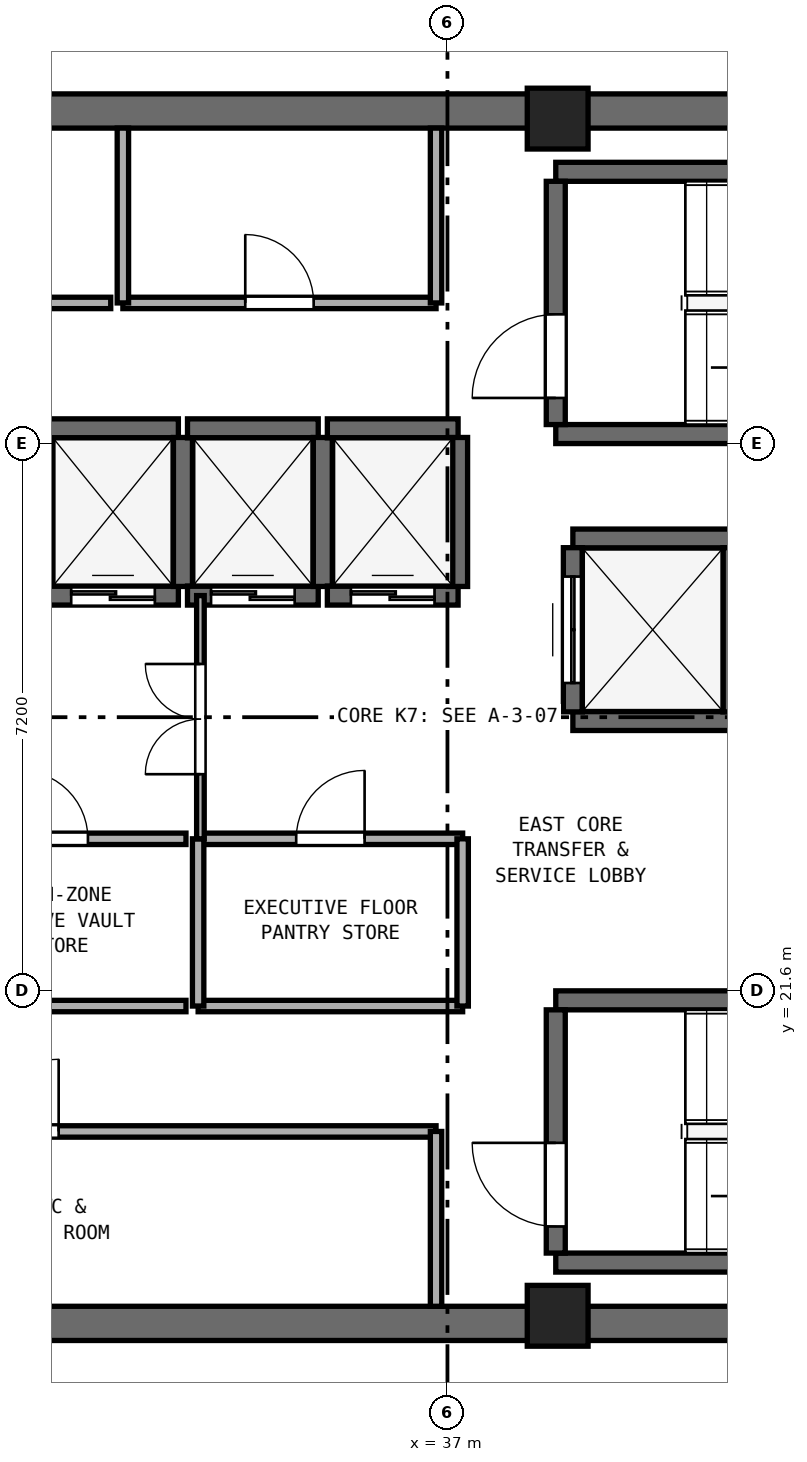
"""IFC4 building model, lengths in metres.
Left out: names, types, materials, properties, quantities, classifications, styles, units other than length and angle.
Written with IfcOpenShell. Run it as: python <this file> out.ifc"""

import sys

from ifc_helpers import new_model, si_unit, direction, frame, frame_2d, origin, origin_2d, place, context, subcontext, project, spatial, rectangle, extrude, element, fill, save


model = new_model("IFC4")
c1 = context("Model", 3, precision=1e-05, world=origin(), true_north=direction((0.0, 1.0)))
c2 = subcontext(c1, "Body", "Model", "MODEL_VIEW")
j1 = project(units=[si_unit("LENGTHUNIT", "METRE"), si_unit("PLANEANGLEUNIT", "RADIAN")], contexts=[c1])
p1 = place(None, origin())
s1 = spatial("IfcSite", under=j1, at=p1, CompositionType="ELEMENT")
p2 = place(p1, origin())
s2 = spatial("IfcBuilding", under=s1, at=p2, CompositionType="ELEMENT")
p3 = place(p2, frame((0.0, 0.0, 232.6)))
s3 = spatial("IfcBuildingStorey", under=s2, at=p3, CompositionType="ELEMENT", Elevation=232.6)
for number, where, z_axis, x_axis in (
    (1, (25.4, 17.225, 0.0), (0.0, 0.0, 1.0), (1.0, 0.0, 0.0)),
    (2, (25.4, 33.175, 0.0), (0.0, 0.0, 1.0), (1.0, 0.0, 0.0)),
):
    element("IfcWall", number, at=place(p3, frame(where, z_axis=z_axis, x_axis=x_axis)), inside=s3, PredefinedType="SHEAR", context=c2, shape_type="SweptSolid", body=[
        extrude(rectangle(XDim=23.2, YDim=0.45, at=frame_2d((11.6, 0.0))), origin(), (0.0, 0.0, 1.0), 3.51),
    ])
for number, where, z_axis, x_axis in (
    (3, (38.45, 17.325, 0.0), (0.0, 0.0, 1.0), (1.0, 0.0, 0.0)),
    (4, (38.45, 33.075, 0.0), (0.0, 0.0, 1.0), (1.0, 0.0, 0.0)),
):
    element("IfcColumn", number, at=place(p3, frame(where, z_axis=z_axis, x_axis=x_axis)), inside=s3, PredefinedType="PILASTER", context=c2, shape_type="SweptSolid", body=[
        extrude(rectangle(XDim=0.8, YDim=0.8, at=origin_2d()), origin(), (0.0, 0.0, 1.0), 3.8),
    ])
for number, where, z_axis, x_axis in (
    (5, (38.425, 28.925, 0.0), (0.0, 0.0, 1.0), (1.0, 0.0, 0.0)),
    (6, (38.425, 32.375, 0.0), (0.0, 0.0, 1.0), (1.0, 0.0, 0.0)),
):
    element("IfcWall", number, at=place(p3, frame(where, z_axis=z_axis, x_axis=x_axis)), inside=s3, PredefinedType="SHEAR", context=c2, shape_type="SweptSolid", body=[
        extrude(rectangle(XDim=7.3, YDim=0.25, at=frame_2d((3.65, 0.0))), origin(), (0.0, 0.0, 1.0), 3.51),
    ])
p4 = place(p3, frame((38.425, 29.05, 0.0), z_axis=(0.0, 0.0, 1.0), x_axis=(0.0, 1.0, 0.0)))
e7 = element("IfcWall", 7, at=p4, inside=s3, PredefinedType="SHEAR", context=c2, shape_type="SweptSolid", body=[
    extrude(rectangle(XDim=3.2, YDim=0.25, at=frame_2d((1.6, 0.0))), origin(), (0.0, 0.0, 1.0), 3.51),
])
p5 = place(p4, frame((0.35, 0.0, 0.0)))
e8 = element("IfcOpeningElement", 8, at=p5, cuts=e7, PredefinedType="OPENING", context=c2, shape_type="SweptSolid", body=[
    extrude(rectangle(XDim=1.1, YDim=2.15, at=frame_2d((0.55, 1.075))), frame((0.0, 0.135, 0.0), z_axis=(0.0, -1.0, 0.0), x_axis=(1.0, 0.0, 0.0)), (0.0, 0.0, 1.0), 0.27),
])
for number, where, z_axis, x_axis in (
    (9, (38.425, 18.025, 0.0), (0.0, 0.0, 1.0), (1.0, 0.0, 0.0)),
    (10, (38.425, 21.475, 0.0), (0.0, 0.0, 1.0), (1.0, 0.0, 0.0)),
):
    element("IfcWall", number, at=place(p3, frame(where, z_axis=z_axis, x_axis=x_axis)), inside=s3, PredefinedType="SHEAR", context=c2, shape_type="SweptSolid", body=[
        extrude(rectangle(XDim=7.3, YDim=0.25, at=frame_2d((3.65, 0.0))), origin(), (0.0, 0.0, 1.0), 3.51),
    ])
p6 = place(p3, frame((38.425, 18.15, 0.0), z_axis=(0.0, 0.0, 1.0), x_axis=(0.0, 1.0, 0.0)))
e11 = element("IfcWall", 11, at=p6, inside=s3, PredefinedType="SHEAR", context=c2, shape_type="SweptSolid", body=[
    extrude(rectangle(XDim=3.2, YDim=0.25, at=frame_2d((1.6, 0.0))), origin(), (0.0, 0.0, 1.0), 3.51),
])
p7 = place(p6, frame((0.35, 0.0, 0.0)))
e12 = element("IfcOpeningElement", 12, at=p7, cuts=e11, PredefinedType="OPENING", context=c2, shape_type="SweptSolid", body=[
    extrude(rectangle(XDim=1.1, YDim=2.15, at=frame_2d((0.55, 1.075))), frame((0.0, 0.135, 0.0), z_axis=(0.0, -1.0, 0.0), x_axis=(1.0, 0.0, 0.0)), (0.0, 0.0, 1.0), 0.27),
])
p8 = place(p3, frame((31.74, 26.8, 0.0), z_axis=(0.0, 0.0, 1.0), x_axis=(1.0, 0.0, 0.0)))
e13 = element("IfcWall", 13, at=p8, inside=s3, PredefinedType="SHEAR", context=c2, shape_type="SweptSolid", body=[
    extrude(rectangle(XDim=1.72, YDim=0.25, at=frame_2d((0.86, 0.0))), origin(), (0.0, 0.0, 1.0), 3.51),
])
p9 = place(p8, frame((0.31, 0.0, 0.0)))
e14 = element("IfcOpeningElement", 14, at=p9, cuts=e13, PredefinedType="OPENING", context=c2, shape_type="SweptSolid", body=[
    extrude(rectangle(XDim=1.1, YDim=2.15, at=frame_2d((0.55, 1.075))), frame((0.0, 0.135, 0.0), z_axis=(0.0, -1.0, 0.0), x_axis=(1.0, 0.0, 0.0)), (0.0, 0.0, 1.0), 0.27),
])
p10 = place(p3, frame((31.74, 29.0, 0.0), z_axis=(0.0, 0.0, 1.0), x_axis=(1.0, 0.0, 0.0)))
e15 = element("IfcWall", 15, at=p10, inside=s3, PredefinedType="SHEAR", context=c2, shape_type="SweptSolid", body=[
    extrude(rectangle(XDim=1.72, YDim=0.25, at=frame_2d((0.86, 0.0))), origin(), (0.0, 0.0, 1.0), 3.51),
])
p11 = place(p3, frame((33.52, 26.92, 0.0), z_axis=(0.0, 0.0, 1.0), x_axis=(0.0, 1.0, 0.0)))
e16 = element("IfcWall", 16, at=p11, inside=s3, PredefinedType="SHEAR", context=c2, shape_type="SweptSolid", body=[
    extrude(rectangle(XDim=1.96, YDim=0.25, at=frame_2d((0.98, 0.0))), origin(), (0.0, 0.0, 1.0), 3.51),
])
p12 = place(p3, frame((33.58, 26.8, 0.0), z_axis=(0.0, 0.0, 1.0), x_axis=(1.0, 0.0, 0.0)))
e17 = element("IfcWall", 17, at=p12, inside=s3, PredefinedType="SHEAR", context=c2, shape_type="SweptSolid", body=[
    extrude(rectangle(XDim=1.72, YDim=0.25, at=frame_2d((0.86, 0.0))), origin(), (0.0, 0.0, 1.0), 3.51),
])
p13 = place(p12, frame((0.31, 0.0, 0.0)))
e18 = element("IfcOpeningElement", 18, at=p13, cuts=e17, PredefinedType="OPENING", context=c2, shape_type="SweptSolid", body=[
    extrude(rectangle(XDim=1.1, YDim=2.15, at=frame_2d((0.55, 1.075))), frame((0.0, 0.135, 0.0), z_axis=(0.0, -1.0, 0.0), x_axis=(1.0, 0.0, 0.0)), (0.0, 0.0, 1.0), 0.27),
])
p14 = place(p3, frame((33.58, 29.0, 0.0), z_axis=(0.0, 0.0, 1.0), x_axis=(1.0, 0.0, 0.0)))
e19 = element("IfcWall", 19, at=p14, inside=s3, PredefinedType="SHEAR", context=c2, shape_type="SweptSolid", body=[
    extrude(rectangle(XDim=1.72, YDim=0.25, at=frame_2d((0.86, 0.0))), origin(), (0.0, 0.0, 1.0), 3.51),
])
p15 = place(p3, frame((35.36, 26.92, 0.0), z_axis=(0.0, 0.0, 1.0), x_axis=(0.0, 1.0, 0.0)))
e20 = element("IfcWall", 20, at=p15, inside=s3, PredefinedType="SHEAR", context=c2, shape_type="SweptSolid", body=[
    extrude(rectangle(XDim=1.96, YDim=0.25, at=frame_2d((0.98, 0.0))), origin(), (0.0, 0.0, 1.0), 3.51),
])
p16 = place(p3, frame((35.42, 26.8, 0.0), z_axis=(0.0, 0.0, 1.0), x_axis=(1.0, 0.0, 0.0)))
e21 = element("IfcWall", 21, at=p16, inside=s3, PredefinedType="SHEAR", context=c2, shape_type="SweptSolid", body=[
    extrude(rectangle(XDim=1.72, YDim=0.25, at=frame_2d((0.86, 0.0))), origin(), (0.0, 0.0, 1.0), 3.51),
])
p17 = place(p16, frame((0.31, 0.0, 0.0)))
e22 = element("IfcOpeningElement", 22, at=p17, cuts=e21, PredefinedType="OPENING", context=c2, shape_type="SweptSolid", body=[
    extrude(rectangle(XDim=1.1, YDim=2.15, at=frame_2d((0.55, 1.075))), frame((0.0, 0.135, 0.0), z_axis=(0.0, -1.0, 0.0), x_axis=(1.0, 0.0, 0.0)), (0.0, 0.0, 1.0), 0.27),
])
p18 = place(p3, frame((35.42, 29.0, 0.0), z_axis=(0.0, 0.0, 1.0), x_axis=(1.0, 0.0, 0.0)))
e23 = element("IfcWall", 23, at=p18, inside=s3, PredefinedType="SHEAR", context=c2, shape_type="SweptSolid", body=[
    extrude(rectangle(XDim=1.72, YDim=0.25, at=frame_2d((0.86, 0.0))), origin(), (0.0, 0.0, 1.0), 3.51),
])
p19 = place(p3, frame((37.14, 26.92, 0.0), z_axis=(0.0, 0.0, 1.0), x_axis=(0.0, 1.0, 0.0)))
e24 = element("IfcWall", 24, at=p19, inside=s3, PredefinedType="SHEAR", context=c2, shape_type="SweptSolid", body=[
    extrude(rectangle(XDim=1.96, YDim=0.25, at=frame_2d((0.98, 0.0))), origin(), (0.0, 0.0, 1.0), 3.51),
])
for number, where, z_axis, x_axis in (
    (25, (38.65, 25.15, 0.0), (0.0, 0.0, 1.0), (1.0, 0.0, 0.0)),
    (26, (38.65, 27.55, 0.0), (0.0, 0.0, 1.0), (1.0, 0.0, 0.0)),
):
    element("IfcWall", number, at=place(p3, frame(where, z_axis=z_axis, x_axis=x_axis)), inside=s3, PredefinedType="SHEAR", context=c2, shape_type="SweptSolid", body=[
        extrude(rectangle(XDim=2.1, YDim=0.25, at=frame_2d((1.05, 0.0))), origin(), (0.0, 0.0, 1.0), 3.51),
    ])
p20 = place(p3, frame((38.65, 25.27, 0.0), z_axis=(0.0, 0.0, 1.0), x_axis=(0.0, 1.0, 0.0)))
e27 = element("IfcWall", 27, at=p20, inside=s3, PredefinedType="SHEAR", context=c2, shape_type="SweptSolid", body=[
    extrude(rectangle(XDim=2.16, YDim=0.25, at=frame_2d((1.08, 0.0))), origin(), (0.0, 0.0, 1.0), 3.51),
])
p21 = place(p20, frame((0.38, 0.0, 0.0)))
e28 = element("IfcOpeningElement", 28, at=p21, cuts=e27, PredefinedType="OPENING", context=c2, shape_type="SweptSolid", body=[
    extrude(rectangle(XDim=1.4, YDim=2.2, at=frame_2d((0.7, 1.1))), frame((0.0, 0.135, 0.0), z_axis=(0.0, -1.0, 0.0), x_axis=(1.0, 0.0, 0.0)), (0.0, 0.0, 1.0), 0.27),
])
p22 = place(p3, frame((40.75, 25.27, 0.0), z_axis=(0.0, 0.0, 1.0), x_axis=(0.0, 1.0, 0.0)))
e29 = element("IfcWall", 29, at=p22, inside=s3, PredefinedType="SHEAR", context=c2, shape_type="SweptSolid", body=[
    extrude(rectangle(XDim=2.16, YDim=0.25, at=frame_2d((1.08, 0.0))), origin(), (0.0, 0.0, 1.0), 3.51),
])
p23 = place(p3, frame((29.33, 30.65, 0.0), z_axis=(0.0, 0.0, 1.0), x_axis=(1.0, 0.0, 0.0)))
e30 = element("IfcWall", 30, at=p23, inside=s3, PredefinedType="PARTITIONING", context=c2, shape_type="SweptSolid", body=[
    extrude(rectangle(XDim=3.24, YDim=0.15, at=frame_2d((1.62, 0.0))), origin(), (0.0, 0.0, 1.0), 3.51),
])
p24 = place(p23, frame((1.145, 0.0, 0.0)))
e31 = element("IfcOpeningElement", 31, at=p24, cuts=e30, PredefinedType="OPENING", context=c2, shape_type="SweptSolid", body=[
    extrude(rectangle(XDim=0.95, YDim=2.1, at=frame_2d((0.475, 1.05))), frame((0.0, 0.085, 0.0), z_axis=(0.0, -1.0, 0.0), x_axis=(1.0, 0.0, 0.0)), (0.0, 0.0, 1.0), 0.17),
])
p25 = place(p3, frame((32.73, 30.65, 0.0), z_axis=(0.0, 0.0, 1.0), x_axis=(1.0, 0.0, 0.0)))
e32 = element("IfcWall", 32, at=p25, inside=s3, PredefinedType="PARTITIONING", context=c2, shape_type="SweptSolid", body=[
    extrude(rectangle(XDim=4.12, YDim=0.15, at=frame_2d((2.06, 0.0))), origin(), (0.0, 0.0, 1.0), 3.51),
])
p26 = place(p25, frame((1.61, 0.0, 0.0)))
e33 = element("IfcOpeningElement", 33, at=p26, cuts=e32, PredefinedType="OPENING", context=c2, shape_type="SweptSolid", body=[
    extrude(rectangle(XDim=0.9, YDim=2.1, at=frame_2d((0.45, 1.05))), frame((0.0, 0.085, 0.0), z_axis=(0.0, -1.0, 0.0), x_axis=(1.0, 0.0, 0.0)), (0.0, 0.0, 1.0), 0.17),
])
for number, where, z_axis, x_axis in (
    (34, (32.73, 30.65, 0.0), (0.0, 0.0, 1.0), (0.0, 1.0, 0.0)),
    (35, (36.85, 30.65, 0.0), (0.0, 0.0, 1.0), (0.0, 1.0, 0.0)),
):
    element("IfcWall", number, at=place(p3, frame(where, z_axis=z_axis, x_axis=x_axis)), inside=s3, PredefinedType="PARTITIONING", context=c2, shape_type="SweptSolid", body=[
        extrude(rectangle(XDim=2.3, YDim=0.15, at=frame_2d((1.15, 0.0))), origin(), (0.0, 0.0, 1.0), 3.51),
    ])
p27 = place(p3, frame((25.97, 19.75, 0.0), z_axis=(0.0, 0.0, 1.0), x_axis=(1.0, 0.0, 0.0)))
e36 = element("IfcWall", 36, at=p27, inside=s3, PredefinedType="PARTITIONING", context=c2, shape_type="SweptSolid", body=[
    extrude(rectangle(XDim=10.88, YDim=0.15, at=frame_2d((5.44, 0.0))), origin(), (0.0, 0.0, 1.0), 3.51),
])
p28 = place(p27, frame((4.965, 0.0, 0.0)))
e37 = element("IfcOpeningElement", 37, at=p28, cuts=e36, PredefinedType="OPENING", context=c2, shape_type="SweptSolid", body=[
    extrude(rectangle(XDim=0.95, YDim=2.1, at=frame_2d((0.475, 1.05))), frame((0.0, 0.085, 0.0), z_axis=(0.0, -1.0, 0.0), x_axis=(1.0, 0.0, 0.0)), (0.0, 0.0, 1.0), 0.17),
])
p29 = place(p3, frame((36.85, 17.45, 0.0), z_axis=(0.0, 0.0, 1.0), x_axis=(0.0, 1.0, 0.0)))
e38 = element("IfcWall", 38, at=p29, inside=s3, PredefinedType="PARTITIONING", context=c2, shape_type="SweptSolid", body=[
    extrude(rectangle(XDim=2.3, YDim=0.15, at=frame_2d((1.15, 0.0))), origin(), (0.0, 0.0, 1.0), 3.51),
])
p30 = place(p3, frame((30.08, 21.4, 0.0), z_axis=(0.0, 0.0, 1.0), x_axis=(1.0, 0.0, 0.0)))
e39 = element("IfcWall", 39, at=p30, inside=s3, PredefinedType="PARTITIONING", context=c2, shape_type="SweptSolid", body=[
    extrude(rectangle(XDim=3.48, YDim=0.15, at=frame_2d((1.74, 0.0))), origin(), (0.0, 0.0, 1.0), 3.51),
])
p31 = place(p3, frame((30.08, 23.6, 0.0), z_axis=(0.0, 0.0, 1.0), x_axis=(1.0, 0.0, 0.0)))
e40 = element("IfcWall", 40, at=p31, inside=s3, PredefinedType="PARTITIONING", context=c2, shape_type="SweptSolid", body=[
    extrude(rectangle(XDim=3.48, YDim=0.15, at=frame_2d((1.74, 0.0))), origin(), (0.0, 0.0, 1.0), 3.51),
])
p32 = place(p31, frame((1.29, 0.0, 0.0)))
e41 = element("IfcOpeningElement", 41, at=p32, cuts=e40, PredefinedType="OPENING", context=c2, shape_type="SweptSolid", body=[
    extrude(rectangle(XDim=0.9, YDim=2.1, at=frame_2d((0.45, 1.05))), frame((0.0, 0.085, 0.0), z_axis=(0.0, -1.0, 0.0), x_axis=(1.0, 0.0, 0.0)), (0.0, 0.0, 1.0), 0.17),
])
p33 = place(p3, frame((33.72, 21.4, 0.0), z_axis=(0.0, 0.0, 1.0), x_axis=(1.0, 0.0, 0.0)))
e42 = element("IfcWall", 42, at=p33, inside=s3, PredefinedType="PARTITIONING", context=c2, shape_type="SweptSolid", body=[
    extrude(rectangle(XDim=3.48, YDim=0.15, at=frame_2d((1.74, 0.0))), origin(), (0.0, 0.0, 1.0), 3.51),
])
p34 = place(p3, frame((33.72, 23.6, 0.0), z_axis=(0.0, 0.0, 1.0), x_axis=(1.0, 0.0, 0.0)))
e43 = element("IfcWall", 43, at=p34, inside=s3, PredefinedType="PARTITIONING", context=c2, shape_type="SweptSolid", body=[
    extrude(rectangle(XDim=3.48, YDim=0.15, at=frame_2d((1.74, 0.0))), origin(), (0.0, 0.0, 1.0), 3.51),
])
p35 = place(p34, frame((1.29, 0.0, 0.0)))
e44 = element("IfcOpeningElement", 44, at=p35, cuts=e43, PredefinedType="OPENING", context=c2, shape_type="SweptSolid", body=[
    extrude(rectangle(XDim=0.9, YDim=2.1, at=frame_2d((0.45, 1.05))), frame((0.0, 0.085, 0.0), z_axis=(0.0, -1.0, 0.0), x_axis=(1.0, 0.0, 0.0)), (0.0, 0.0, 1.0), 0.17),
])
for number, where, z_axis, x_axis in (
    (45, (33.72, 21.4, 0.0), (0.0, 0.0, 1.0), (0.0, 1.0, 0.0)),
    (46, (37.2, 21.4, 0.0), (0.0, 0.0, 1.0), (0.0, 1.0, 0.0)),
):
    element("IfcWall", number, at=place(p3, frame(where, z_axis=z_axis, x_axis=x_axis)), inside=s3, PredefinedType="PARTITIONING", context=c2, shape_type="SweptSolid", body=[
        extrude(rectangle(XDim=2.2, YDim=0.15, at=frame_2d((1.1, 0.0))), origin(), (0.0, 0.0, 1.0), 3.51),
    ])
p36 = place(p3, frame((33.75, 23.6, 0.0), z_axis=(0.0, 0.0, 1.0), x_axis=(0.0, 1.0, 0.0)))
e47 = element("IfcWall", 47, at=p36, inside=s3, PredefinedType="PARTITIONING", context=c2, shape_type="SweptSolid", body=[
    extrude(rectangle(XDim=3.2, YDim=0.1, at=frame_2d((1.6, 0.0))), origin(), (0.0, 0.0, 1.0), 3.51),
])
p37 = place(p36, frame((0.85, 0.0, 0.0)))
e48 = element("IfcOpeningElement", 48, at=p37, cuts=e47, PredefinedType="OPENING", context=c2, shape_type="SweptSolid", body=[
    extrude(rectangle(XDim=1.45, YDim=2.12, at=frame_2d((0.725, 1.06))), frame((0.0, 0.06, 0.0), z_axis=(0.0, -1.0, 0.0), x_axis=(1.0, 0.0, 0.0)), (0.0, 0.0, 1.0), 0.12),
])
p38 = place(p5, origin())
e49 = element("IfcDoor", 49, at=p38, inside=s3, OperationType="SINGLE_SWING_LEFT", PredefinedType="DOOR", context=c2, shape_type="SweptSolid", body=[
    extrude(rectangle(XDim=1.1, YDim=2.15, at=frame_2d((0.55, 1.075))), frame((0.0, 0.025, 0.0), z_axis=(0.0, -1.0, 0.0), x_axis=(1.0, 0.0, 0.0)), (0.0, 0.0, 1.0), 0.05),
])
fill(e8, e49)
p39 = place(p7, origin())
e50 = element("IfcDoor", 50, at=p39, inside=s3, OperationType="SINGLE_SWING_RIGHT", PredefinedType="DOOR", context=c2, shape_type="SweptSolid", body=[
    extrude(rectangle(XDim=1.1, YDim=2.15, at=frame_2d((0.55, 1.075))), frame((0.0, 0.025, 0.0), z_axis=(0.0, -1.0, 0.0), x_axis=(1.0, 0.0, 0.0)), (0.0, 0.0, 1.0), 0.05),
])
fill(e12, e50)
p40 = place(p9, origin())
e51 = element("IfcDoor", 51, at=p40, inside=s3, OperationType="DOUBLE_DOOR_SLIDING", PredefinedType="DOOR", context=c2, shape_type="SweptSolid", body=[
    extrude(rectangle(XDim=1.1, YDim=2.15, at=frame_2d((0.55, 1.075))), frame((0.0, 0.025, 0.0), z_axis=(0.0, -1.0, 0.0), x_axis=(1.0, 0.0, 0.0)), (0.0, 0.0, 1.0), 0.05),
])
fill(e14, e51)
p41 = place(p13, origin())
e52 = element("IfcDoor", 52, at=p41, inside=s3, OperationType="DOUBLE_DOOR_SLIDING", PredefinedType="DOOR", context=c2, shape_type="SweptSolid", body=[
    extrude(rectangle(XDim=1.1, YDim=2.15, at=frame_2d((0.55, 1.075))), frame((0.0, 0.025, 0.0), z_axis=(0.0, -1.0, 0.0), x_axis=(1.0, 0.0, 0.0)), (0.0, 0.0, 1.0), 0.05),
])
fill(e18, e52)
p42 = place(p17, origin())
e53 = element("IfcDoor", 53, at=p42, inside=s3, OperationType="DOUBLE_DOOR_SLIDING", PredefinedType="DOOR", context=c2, shape_type="SweptSolid", body=[
    extrude(rectangle(XDim=1.1, YDim=2.15, at=frame_2d((0.55, 1.075))), frame((0.0, 0.025, 0.0), z_axis=(0.0, -1.0, 0.0), x_axis=(1.0, 0.0, 0.0)), (0.0, 0.0, 1.0), 0.05),
])
fill(e22, e53)
p43 = place(p21, origin())
e54 = element("IfcDoor", 54, at=p43, inside=s3, OperationType="DOUBLE_DOOR_SLIDING", PredefinedType="DOOR", context=c2, shape_type="SweptSolid", body=[
    extrude(rectangle(XDim=1.4, YDim=2.2, at=frame_2d((0.7, 1.1))), frame((0.0, 0.025, 0.0), z_axis=(0.0, -1.0, 0.0), x_axis=(1.0, 0.0, 0.0)), (0.0, 0.0, 1.0), 0.05),
])
fill(e28, e54)
p44 = place(p26, origin())
e55 = element("IfcDoor", 55, at=p44, inside=s3, OperationType="SINGLE_SWING_LEFT", PredefinedType="DOOR", context=c2, shape_type="SweptSolid", body=[
    extrude(rectangle(XDim=0.9, YDim=2.1, at=frame_2d((0.45, 1.05))), frame((0.0, 0.025, 0.0), z_axis=(0.0, -1.0, 0.0), x_axis=(1.0, 0.0, 0.0)), (0.0, 0.0, 1.0), 0.05),
])
fill(e33, e55)
p45 = place(p28, origin())
e56 = element("IfcDoor", 56, at=p45, inside=s3, OperationType="SINGLE_SWING_RIGHT", PredefinedType="DOOR", context=c2, shape_type="SweptSolid", body=[
    extrude(rectangle(XDim=0.95, YDim=2.1, at=frame_2d((0.475, 1.05))), frame((0.0, 0.025, 0.0), z_axis=(0.0, -1.0, 0.0), x_axis=(1.0, 0.0, 0.0)), (0.0, 0.0, 1.0), 0.05),
])
fill(e37, e56)
p46 = place(p32, origin())
e57 = element("IfcDoor", 57, at=p46, inside=s3, OperationType="SINGLE_SWING_LEFT", PredefinedType="DOOR", context=c2, shape_type="SweptSolid", body=[
    extrude(rectangle(XDim=0.9, YDim=2.1, at=frame_2d((0.45, 1.05))), frame((0.0, 0.025, 0.0), z_axis=(0.0, -1.0, 0.0), x_axis=(1.0, 0.0, 0.0)), (0.0, 0.0, 1.0), 0.05),
])
fill(e41, e57)
p47 = place(p35, origin())
e58 = element("IfcDoor", 58, at=p47, inside=s3, OperationType="SINGLE_SWING_RIGHT", PredefinedType="DOOR", context=c2, shape_type="SweptSolid", body=[
    extrude(rectangle(XDim=0.9, YDim=2.1, at=frame_2d((0.45, 1.05))), frame((0.0, 0.025, 0.0), z_axis=(0.0, -1.0, 0.0), x_axis=(1.0, 0.0, 0.0)), (0.0, 0.0, 1.0), 0.05),
])
fill(e44, e58)
p48 = place(p37, origin())
e59 = element("IfcDoor", 59, at=p48, inside=s3, OperationType="DOUBLE_DOOR_SINGLE_SWING", PredefinedType="DOOR", context=c2, shape_type="SweptSolid", body=[
    extrude(rectangle(XDim=1.45, YDim=2.12, at=frame_2d((0.725, 1.06))), frame((0.0, 0.025, 0.0), z_axis=(0.0, -1.0, 0.0), x_axis=(1.0, 0.0, 0.0)), (0.0, 0.0, 1.0), 0.05),
])
fill(e48, e59)
save(model, sys.argv[1])
